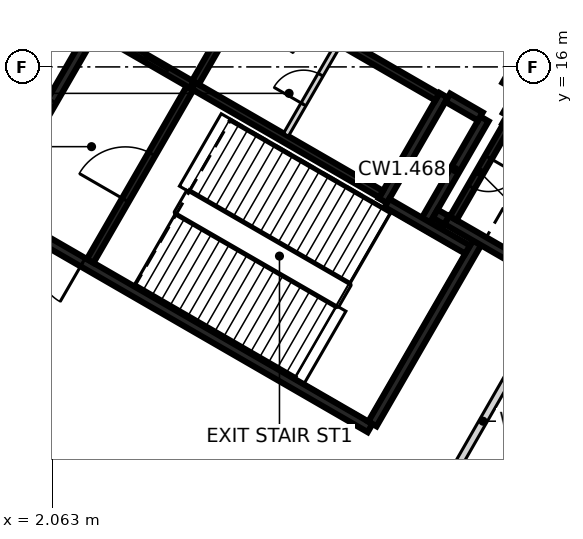
"""IFC4 building model, lengths in metres.
Left out: names, types, materials, properties, quantities, classifications, styles, units other than length and angle.
Written with IfcOpenShell. Run it as: python <this file> out.ifc"""

import sys

from ifc_helpers import new_model, si_unit, direction, frame, frame_2d, origin, place, context, subcontext, project, spatial, rectangle, extrude, element, fill, save


model = new_model("IFC4")
c1 = context("Model", 3, precision=1e-05, world=origin(), true_north=direction((0.0, 1.0)))
c2 = subcontext(c1, "Body", "Model", "MODEL_VIEW")
j1 = project(units=[si_unit("LENGTHUNIT", "METRE"), si_unit("PLANEANGLEUNIT", "RADIAN")], contexts=[c1])
p1 = place(None, origin())
s1 = spatial("IfcSite", under=j1, at=p1, CompositionType="ELEMENT")
p2 = place(p1, origin())
s2 = spatial("IfcBuilding", under=s1, at=p2, CompositionType="ELEMENT")
p3 = place(p2, frame((0.0, 0.0, 29.5)))
s3 = spatial("IfcBuildingStorey", under=s2, at=p3, CompositionType="ELEMENT", Elevation=29.5)
p4 = place(p3, frame((10.42, 6.498, 0.0), z_axis=(0.0, 0.0, 1.0), x_axis=(-0.866021906294, 0.500006057782, 0.0)))
e1 = element("IfcWall", 1, at=p4, inside=s3, PredefinedType="SHEAR", context=c2, shape_type="SweptSolid", body=[
    extrude(rectangle(XDim=11.55, YDim=0.25, at=frame_2d((5.775, 0.0))), origin(), (0.0, 0.0, 1.0), 5.025),
])
p5 = place(p4, frame((10.025, 0.0, 0.0)))
e2 = element("IfcOpeningElement", 2, at=p5, cuts=e1, PredefinedType="OPENING", context=c2, shape_type="SweptSolid", body=[
    extrude(rectangle(XDim=1.2, YDim=2.1, at=frame_2d((0.6, 1.05))), frame((0.0, 0.135, 0.0), z_axis=(0.0, -1.0, 0.0), x_axis=(1.0, 0.0, 0.0)), (0.0, 0.0, 1.0), 0.27),
])
p6 = place(p4, frame((8.725, 0.0, 0.0)))
e3 = element("IfcOpeningElement", 3, at=p6, cuts=e1, PredefinedType="OPENING", context=c2, shape_type="SweptSolid", body=[
    extrude(rectangle(XDim=1.2, YDim=2.1, at=frame_2d((0.6, 1.05))), frame((0.0, 0.135, 0.0), z_axis=(0.0, -1.0, 0.0), x_axis=(1.0, 0.0, 0.0)), (0.0, 0.0, 1.0), 0.27),
])
p7 = place(p3, frame((0.48, 12.381, 0.0), z_axis=(0.0, 0.0, 1.0), x_axis=(0.49999885962, 0.866026062182, 0.0)))
e4 = element("IfcWall", 4, at=p7, inside=s3, PredefinedType="SHEAR", context=c2, shape_type="SweptSolid", body=[
    extrude(rectangle(XDim=5.225, YDim=0.25, at=frame_2d((2.612, 0.0))), origin(), (0.0, 0.0, 1.0), 5.025),
])
p8 = place(p7, frame((1.95, 0.0, 0.0)))
e5 = element("IfcOpeningElement", 5, at=p8, cuts=e4, PredefinedType="OPENING", context=c2, shape_type="SweptSolid", body=[
    extrude(rectangle(XDim=1.2, YDim=2.1, at=frame_2d((0.6, 1.05))), frame((0.0, 0.135, 0.0), z_axis=(0.0, -1.0, 0.0), x_axis=(1.0, 0.0, 0.0)), (0.0, 0.0, 1.0), 0.27),
])
p9 = place(p3, frame((13.238, 11.378, 0.0), z_axis=(0.0, 0.0, 1.0), x_axis=(-0.500008851346, -0.866020293397, 0.0)))
e6 = element("IfcWall", 6, at=p9, inside=s3, PredefinedType="SHEAR", context=c2, shape_type="SweptSolid", body=[
    extrude(rectangle(XDim=5.51, YDim=0.25, at=frame_2d((2.755, 0.0))), origin(), (0.0, 0.0, 1.0), 5.025),
])
p10 = place(p3, frame((12.357, 15.252, 0.0), z_axis=(0.0, 0.0, 1.0), x_axis=(-0.500028443584, -0.866008981251, 0.0)))
e7 = element("IfcWall", 7, at=p10, inside=s3, PredefinedType="SHEAR", context=c2, shape_type="SweptSolid", body=[
    extrude(rectangle(XDim=3.2, YDim=0.25, at=frame_2d((1.6, 0.0))), origin(), (0.0, 0.0, 1.0), 5.025),
])
p11 = place(p3, frame((14.918, 10.54, 0.0), z_axis=(0.0, 0.0, 1.0), x_axis=(-0.866063538972, 0.499933942099, 0.0)))
e8 = element("IfcWall", 8, at=p11, inside=s3, PredefinedType="SHEAR", context=c2, shape_type="SweptSolid", body=[
    extrude(rectangle(XDim=2.865, YDim=0.25, at=frame_2d((1.432, 0.0))), origin(), (0.0, 0.0, 1.0), 5.025),
])
p12 = place(p3, frame((13.963, 14.614, 0.0), z_axis=(0.0, 0.0, 1.0), x_axis=(0.866042235819, -0.499970844928, 0.0)))
e9 = element("IfcWall", 9, at=p12, inside=s3, PredefinedType="SHEAR", context=c2, shape_type="SweptSolid", body=[
    extrude(rectangle(XDim=2.865, YDim=0.25, at=frame_2d((1.432, 0.0))), origin(), (0.0, 0.0, 1.0), 5.025),
])
p13 = place(p3, frame((11.888, 11.961, 0.0), z_axis=(0.0, 0.0, 1.0), x_axis=(0.500003324108, 0.866023484601, 0.0)))
e10 = element("IfcWall", 10, at=p13, inside=s3, PredefinedType="SHEAR", context=c2, shape_type="SweptSolid", body=[
    extrude(rectangle(XDim=3.085, YDim=0.25, at=frame_2d((1.542, 0.0))), origin(), (0.0, 0.0, 1.0), 5.025),
])
p14 = place(p3, frame((10.865, 12.418, 0.0), z_axis=(0.0, 0.0, 1.0), x_axis=(0.866026229868, -0.499998569178, 0.0)))
e11 = element("IfcWall", 11, at=p14, inside=s3, PredefinedType="SHEAR", context=c2, shape_type="SweptSolid", body=[
    extrude(rectangle(XDim=2.449, YDim=0.25, at=frame_2d((1.225, 0.0))), origin(), (0.0, 0.0, 1.0), 5.025),
])
p15 = place(p3, frame((14.945, 17.135, 0.0), z_axis=(0.0, 0.0, 1.0), x_axis=(-0.499983108224, -0.866035156036, 0.0)))
e12 = element("IfcWall", 12, at=p15, inside=s3, PredefinedType="SHEAR", context=c2, shape_type="SweptSolid", body=[
    extrude(rectangle(XDim=1.865, YDim=0.25, at=frame_2d((0.932, 0.0))), origin(), (0.0, 0.0, 1.0), 5.025),
])
p16 = place(p15, frame((0.535, 0.0, 0.0)))
e13 = element("IfcOpeningElement", 13, at=p16, cuts=e12, PredefinedType="OPENING", context=c2, shape_type="SweptSolid", body=[
    extrude(rectangle(XDim=1.25, YDim=2.1, at=frame_2d((0.625, 1.05))), frame((0.0, 0.135, 0.0), z_axis=(0.0, -1.0, 0.0), x_axis=(1.0, 0.0, 0.0)), (0.0, 0.0, 1.0), 0.27),
])
p17 = place(p3, frame((13.322, 14.695, 0.0), z_axis=(0.0, 0.0, 1.0), x_axis=(-0.866017078145, 0.500014420154, 0.0)))
e14 = element("IfcWall", 14, at=p17, inside=s3, PredefinedType="SHEAR", context=c2, shape_type="SweptSolid", body=[
    extrude(rectangle(XDim=0.989, YDim=0.25, at=frame_2d((0.495, 0.0))), origin(), (0.0, 0.0, 1.0), 5.025),
])
p18 = place(p3, frame((14.368, 15.315, 0.0), z_axis=(0.0, 0.0, 1.0), x_axis=(-0.499897359611, -0.866084655132, 0.0)))
e15 = element("IfcWall", 15, at=p18, inside=s3, PredefinedType="SHEAR", context=c2, shape_type="SweptSolid", body=[
    extrude(rectangle(XDim=0.685, YDim=0.25, at=frame_2d((0.342, 0.0))), origin(), (0.0, 0.0, 1.0), 5.025),
])
p19 = place(p3, frame((12.433, 11.964, 0.0), z_axis=(0.0, 0.0, 1.0), x_axis=(-0.866055875208, 0.499947218231, 0.0)))
e16 = element("IfcWall", 16, at=p19, inside=s3, PredefinedType="SHEAR", context=c2, shape_type="SweptSolid", body=[
    extrude(rectangle(XDim=0.345, YDim=0.25, at=frame_2d((0.172, 0.0))), origin(), (0.0, 0.0, 1.0), 5.025),
])
p20 = place(p3, frame((5.775, 15.502, 0.0), z_axis=(0.0, 0.0, 1.0), x_axis=(0.866020080793, -0.500009219579, 0.0)))
e17 = element("IfcWall", 17, at=p20, inside=s3, PredefinedType="SHEAR", context=c2, shape_type="SweptSolid", body=[
    extrude(rectangle(XDim=5.699, YDim=0.2, at=frame_2d((2.85, 0.0))), origin(), (0.0, 0.0, 1.0), 5.025),
])
p21 = place(p3, frame((12.185, 15.207, 0.0), z_axis=(0.0, 0.0, 1.0), x_axis=(-0.866020080793, 0.500009219579, 0.0)))
e18 = element("IfcWall", 18, at=p21, inside=s3, PredefinedType="SHEAR", context=c2, shape_type="SweptSolid", body=[
    extrude(rectangle(XDim=5.699, YDim=0.2, at=frame_2d((2.85, 0.0))), origin(), (0.0, 0.0, 1.0), 5.025),
])
p22 = place(p21, frame((3.874, 0.0, 0.0)))
e19 = element("IfcOpeningElement", 19, at=p22, cuts=e18, PredefinedType="OPENING", context=c2, shape_type="SweptSolid", body=[
    extrude(rectangle(XDim=0.9, YDim=2.1, at=frame_2d((0.45, 1.05))), frame((0.0, 0.11, 0.0), z_axis=(0.0, -1.0, 0.0), x_axis=(1.0, 0.0, 0.0)), (0.0, 0.0, 1.0), 0.22),
])
p23 = place(p3, frame((3.057, 10.895, 0.0), z_axis=(0.0, 0.0, 1.0), x_axis=(0.499989418164, 0.866031513124, 0.0)))
e20 = element("IfcWall", 20, at=p23, inside=s3, PredefinedType="SHEAR", context=c2, shape_type="SweptSolid", body=[
    extrude(rectangle(XDim=5.251, YDim=0.2, at=frame_2d((2.625, 0.0))), origin(), (0.0, 0.0, 1.0), 5.025),
])
p24 = place(p23, frame((1.849, 0.0, 0.0)))
e21 = element("IfcOpeningElement", 21, at=p24, cuts=e20, PredefinedType="OPENING", context=c2, shape_type="SweptSolid", body=[
    extrude(rectangle(XDim=1.4, YDim=2.1, at=frame_2d((0.7, 1.05))), frame((0.0, 0.11, 0.0), z_axis=(0.0, -1.0, 0.0), x_axis=(1.0, 0.0, 0.0)), (0.0, 0.0, 1.0), 0.22),
])
p25 = place(p3, frame((14.008, 14.442, 0.0), z_axis=(0.0, 0.0, 1.0), x_axis=(-0.499986818241, -0.866033014143, 0.0)))
e22 = element("IfcWall", 22, at=p25, inside=s3, PredefinedType="SHEAR", context=c2, shape_type="SweptSolid", body=[
    extrude(rectangle(XDim=2.798, YDim=0.2, at=frame_2d((1.399, 0.0))), origin(), (0.0, 0.0, 1.0), 5.025),
])
p26 = place(p25, frame((0.949, 0.0, 0.0)))
e23 = element("IfcOpeningElement", 23, at=p26, cuts=e22, PredefinedType="OPENING", context=c2, shape_type="SweptSolid", body=[
    extrude(rectangle(XDim=0.9, YDim=2.1, at=frame_2d((0.45, 1.05))), frame((0.0, 0.11, 0.0), z_axis=(0.0, -1.0, 0.0), x_axis=(1.0, 0.0, 0.0)), (0.0, 0.0, 1.0), 0.22),
])
p27 = place(p3, frame((7.199, 17.97, 0.0), z_axis=(0.0, 0.0, 1.0), x_axis=(-0.499968400327, -0.866043647095, 0.0)))
e24 = element("IfcWall", 24, at=p27, inside=s3, PredefinedType="SHEAR", context=c2, shape_type="SweptSolid", body=[
    extrude(rectangle(XDim=2.75, YDim=0.2, at=frame_2d((1.375, 0.0))), origin(), (0.0, 0.0, 1.0), 5.025),
])
p28 = place(p3, frame((5.725, 15.531, 0.0), z_axis=(0.0, 0.0, 1.0), x_axis=(-0.866037306777, 0.499979382845, 0.0)))
e25 = element("IfcWall", 25, at=p28, inside=s3, PredefinedType="SHEAR", context=c2, shape_type="SweptSolid", body=[
    extrude(rectangle(XDim=2.742, YDim=0.2, at=frame_2d((1.371, 0.0))), origin(), (0.0, 0.0, 1.0), 5.025),
])
p29 = place(p28, frame((0.743, 0.0, 0.0)))
e26 = element("IfcOpeningElement", 26, at=p29, cuts=e25, PredefinedType="OPENING", context=c2, shape_type="SweptSolid", body=[
    extrude(rectangle(XDim=1.3, YDim=2.1, at=frame_2d((0.65, 1.05))), frame((0.0, 0.11, 0.0), z_axis=(0.0, -1.0, 0.0), x_axis=(1.0, 0.0, 0.0)), (0.0, 0.0, 1.0), 0.22),
])
p30 = place(p3, frame((8.207, 14.214, 0.0), z_axis=(0.0, 0.0, 1.0), x_axis=(0.499922376475, 0.866070215109, 0.0)))
e27 = element("IfcWall", 27, at=p30, inside=s3, PredefinedType="PARTITIONING", context=c2, shape_type="SweptSolid", body=[
    extrude(rectangle(XDim=2.749, YDim=0.15, at=frame_2d((1.374, 0.0))), origin(), (0.0, 0.0, 1.0), 5.025),
])
p31 = place(p30, frame((0.924, 0.0, 0.0)))
e28 = element("IfcOpeningElement", 28, at=p31, cuts=e27, PredefinedType="OPENING", context=c2, shape_type="SweptSolid", body=[
    extrude(rectangle(XDim=0.9, YDim=2.1, at=frame_2d((0.45, 1.05))), frame((0.0, 0.085, 0.0), z_axis=(0.0, -1.0, 0.0), x_axis=(1.0, 0.0, 0.0)), (0.0, 0.0, 1.0), 0.17),
])
p32 = place(p3, frame((12.323, 4.813, 0.0), z_axis=(0.0, 0.0, 1.0), x_axis=(0.497551081434, 0.867434678442, 0.0)))
e29 = element("IfcWall", 29, at=p32, inside=s3, PredefinedType="PARTITIONING", context=c2, shape_type="SweptSolid", body=[
    extrude(rectangle(XDim=4.299, YDim=0.2, at=frame_2d((2.149, 0.0))), origin(), (0.0, 0.0, 1.0), 5.025),
])
p33 = place(p29, origin())
e30 = element("IfcDoor", 30, at=p33, inside=s3, OperationType="SLIDING_TO_RIGHT", PredefinedType="DOOR", context=c2, shape_type="SweptSolid", body=[
    extrude(rectangle(XDim=1.3, YDim=2.1, at=frame_2d((0.65, 1.05))), frame((0.0, 0.025, 0.0), z_axis=(0.0, -1.0, 0.0), x_axis=(1.0, 0.0, 0.0)), (0.0, 0.0, 1.0), 0.05),
])
fill(e26, e30)
p34 = place(p6, origin())
e31 = element("IfcDoor", 31, at=p34, inside=s3, OperationType="SINGLE_SWING_RIGHT", PredefinedType="DOOR", context=c2, shape_type="SweptSolid", body=[
    extrude(rectangle(XDim=1.2, YDim=2.1, at=frame_2d((0.6, 1.05))), frame((0.0, 0.025, 0.0), z_axis=(0.0, -1.0, 0.0), x_axis=(1.0, 0.0, 0.0)), (0.0, 0.0, 1.0), 0.05),
])
fill(e3, e31)
p35 = place(p24, origin())
e32 = element("IfcDoor", 32, at=p35, inside=s3, OperationType="SINGLE_SWING_RIGHT", PredefinedType="DOOR", context=c2, shape_type="SweptSolid", body=[
    extrude(rectangle(XDim=1.4, YDim=2.1, at=frame_2d((0.7, 1.05))), frame((0.0, 0.025, 0.0), z_axis=(0.0, -1.0, 0.0), x_axis=(1.0, 0.0, 0.0)), (0.0, 0.0, 1.0), 0.05),
])
fill(e21, e32)
p36 = place(p26, origin())
e33 = element("IfcDoor", 33, at=p36, inside=s3, OperationType="SINGLE_SWING_RIGHT", PredefinedType="DOOR", context=c2, shape_type="SweptSolid", body=[
    extrude(rectangle(XDim=0.9, YDim=2.1, at=frame_2d((0.45, 1.05))), frame((0.0, 0.025, 0.0), z_axis=(0.0, -1.0, 0.0), x_axis=(1.0, 0.0, 0.0)), (0.0, 0.0, 1.0), 0.05),
])
fill(e23, e33)
p37 = place(p31, origin())
e34 = element("IfcDoor", 34, at=p37, inside=s3, OperationType="SINGLE_SWING_LEFT", PredefinedType="DOOR", context=c2, shape_type="SweptSolid", body=[
    extrude(rectangle(XDim=0.9, YDim=2.1, at=frame_2d((0.45, 1.05))), frame((0.0, 0.025, 0.0), z_axis=(0.0, -1.0, 0.0), x_axis=(1.0, 0.0, 0.0)), (0.0, 0.0, 1.0), 0.05),
])
fill(e28, e34)
p38 = place(p8, origin())
e35 = element("IfcDoor", 35, at=p38, inside=s3, OperationType="SINGLE_SWING_LEFT", PredefinedType="DOOR", context=c2, shape_type="SweptSolid", body=[
    extrude(rectangle(XDim=1.2, YDim=2.1, at=frame_2d((0.6, 1.05))), frame((0.0, 0.025, 0.0), z_axis=(0.0, -1.0, 0.0), x_axis=(1.0, 0.0, 0.0)), (0.0, 0.0, 1.0), 0.05),
])
fill(e5, e35)
save(model, sys.argv[1])
